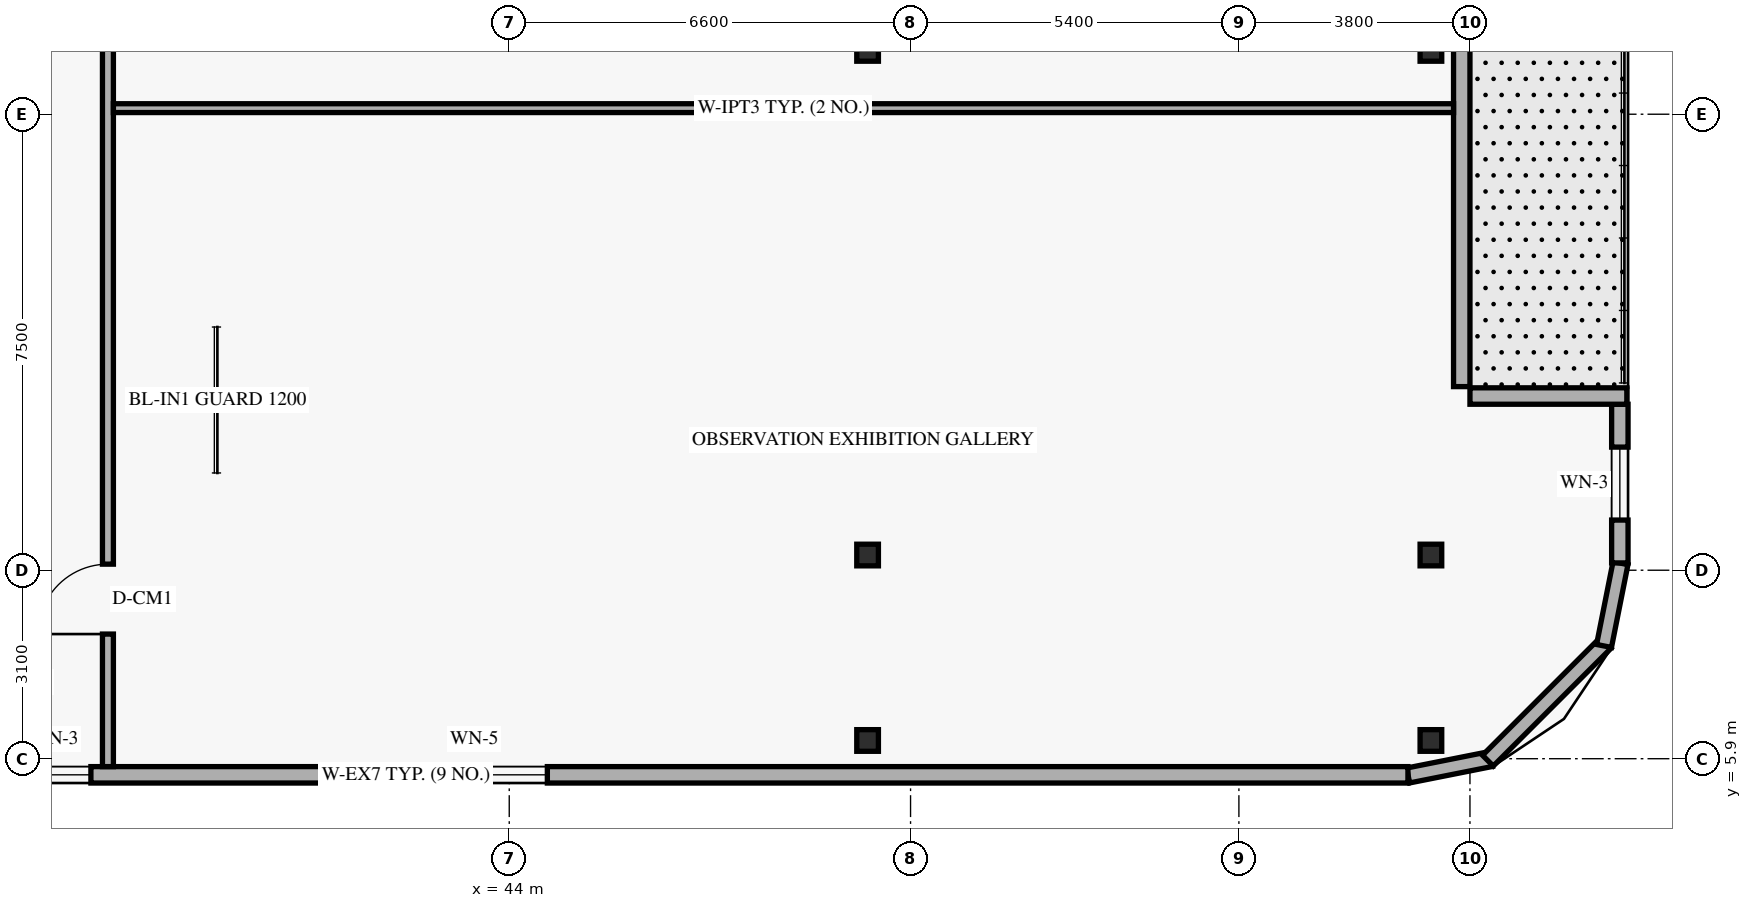
"""IFC4 building model, lengths in metres.
Left out: names, types, materials, properties, quantities, classifications, styles, units other than length and angle.
Written with IfcOpenShell. Run it as: python <this file> out.ifc"""

import sys

from ifc_helpers import new_model, si_unit, direction, frame, frame_2d, origin, origin_2d, place, context, subcontext, project, spatial, rectangle, hollow_rectangle, extrude, element, fill, save


model = new_model("IFC4")
c1 = context("Model", 3, precision=1e-05, world=origin(), true_north=direction((0.0, 1.0)))
c2 = subcontext(c1, "Body", "Model", "MODEL_VIEW")
j1 = project(units=[si_unit("LENGTHUNIT", "METRE"), si_unit("PLANEANGLEUNIT", "RADIAN")], contexts=[c1])
p1 = place(None, origin())
s1 = spatial("IfcSite", under=j1, at=p1, CompositionType="ELEMENT")
p2 = place(p1, origin())
s2 = spatial("IfcBuilding", under=s1, at=p2, CompositionType="ELEMENT")
p3 = place(p2, frame((0.0, 0.0, 282.0)))
s3 = spatial("IfcBuildingStorey", under=s2, at=p3, CompositionType="ELEMENT", Elevation=282.0)
for number, where, z_axis, x_axis in (
    (1, (49.806, 6.2, 0.0), (0.035, 0.0, 0.999), (0.0, 1.0, 0.0)),
    (2, (49.806, 9.25, 0.0), (0.035, 0.0, 0.999), (0.0, 1.0, 0.0)),
    (3, (49.806, 17.55, 0.0), (0.035, 0.0, 0.999), (0.0, 1.0, 0.0)),
):
    element("IfcColumn", number, at=place(p3, frame(where, z_axis=z_axis, x_axis=x_axis)), inside=s3, PredefinedType="COLUMN", context=c2, shape_type="SweptSolid", body=[
        extrude(hollow_rectangle(XDim=0.356, YDim=0.356, WallThickness=0.016, at=origin_2d()), origin(), (0.0, 0.0, 1.0), 5.003),
    ])
for number, where, z_axis, x_axis in (
    (4, (59.013, 6.2, 0.0), (0.058, 0.0, 0.998), (0.0, 1.0, 0.0)),
    (5, (59.013, 9.25, 0.0), (0.058, 0.0, 0.998), (0.0, 1.0, 0.0)),
    (6, (59.013, 17.55, 0.0), (0.058, 0.0, 0.998), (0.0, 1.0, 0.0)),
):
    element("IfcColumn", number, at=place(p3, frame(where, z_axis=z_axis, x_axis=x_axis)), inside=s3, PredefinedType="COLUMN", context=c2, shape_type="SweptSolid", body=[
        extrude(hollow_rectangle(XDim=0.356, YDim=0.356, WallThickness=0.016, at=origin_2d()), origin(), (0.0, 0.0, 1.0), 5.008),
    ])
p4 = place(p3, frame((58.783, 5.624, 0.0), z_axis=(0.0, 0.0, 1.0), x_axis=(0.980809899341, 0.19496651342, 0.0)))
e7 = element("IfcWall", 7, at=p4, inside=s3, PredefinedType="SOLIDWALL", context=c2, shape_type="SweptSolid", body=[
    extrude(rectangle(XDim=1.389, YDim=0.25, at=frame_2d((0.694, 0.0))), origin(), (0.0, 0.0, 1.0), 4.7),
])
p5 = place(p3, frame((60.095, 5.868, 0.0), z_axis=(0.0, 0.0, 1.0), x_axis=(0.707106781187, 0.707106781187, 0.0)))
e8 = element("IfcWall", 8, at=p5, inside=s3, PredefinedType="SOLIDWALL", context=c2, shape_type="SweptSolid", body=[
    extrude(rectangle(XDim=2.739, YDim=0.25, at=frame_2d((1.37, 0.0))), origin(), (0.0, 0.0, 1.0), 4.7),
])
p6 = place(p3, frame((62.005, 7.754, 0.0), z_axis=(0.0, 0.0, 1.0), x_axis=(0.195135625965, 0.9807762678, 0.0)))
e9 = element("IfcWall", 9, at=p6, inside=s3, PredefinedType="SOLIDWALL", context=c2, shape_type="SweptSolid", body=[
    extrude(rectangle(XDim=1.389, YDim=0.25, at=frame_2d((0.694, 0.0))), origin(), (0.0, 0.0, 1.0), 4.7),
])
p7 = place(p3, frame((25.82, 5.635, 0.0), z_axis=(0.0, 0.0, 1.0), x_axis=(1.0, 0.0, 0.0)))
e10 = element("IfcWall", 10, at=p7, inside=s3, PredefinedType="SOLIDWALL", context=c2, shape_type="SweptSolid", body=[
    extrude(rectangle(XDim=32.96, YDim=0.27, at=frame_2d((16.48, 0.0))), origin(), (0.0, 0.0, 1.0), 4.7),
])
p8 = place(p7, frame((3.27, 0.0, 0.85)))
e11 = element("IfcOpeningElement", 11, at=p8, cuts=e10, PredefinedType="OPENING", context=c2, shape_type="SweptSolid", body=[
    extrude(rectangle(XDim=2.4, YDim=1.9, at=frame_2d((1.2, 0.95))), frame((0.0, 0.145, 0.0), z_axis=(0.0, -1.0, 0.0), x_axis=(1.0, 0.0, 0.0)), (0.0, 0.0, 1.0), 0.29),
])
p9 = place(p7, frame((10.1, 0.0, 0.85)))
e12 = element("IfcOpeningElement", 12, at=p9, cuts=e10, PredefinedType="OPENING", context=c2, shape_type="SweptSolid", body=[
    extrude(rectangle(XDim=1.2, YDim=1.5, at=frame_2d((0.6, 0.75))), frame((0.0, 0.145, 0.0), z_axis=(0.0, -1.0, 0.0), x_axis=(1.0, 0.0, 0.0)), (0.0, 0.0, 1.0), 0.29),
])
p10 = place(p7, frame((16.407, 0.0, 0.85)))
e13 = element("IfcOpeningElement", 13, at=p10, cuts=e10, PredefinedType="OPENING", context=c2, shape_type="SweptSolid", body=[
    extrude(rectangle(XDim=2.4, YDim=1.9, at=frame_2d((1.2, 0.95))), frame((0.0, 0.145, 0.0), z_axis=(0.0, -1.0, 0.0), x_axis=(1.0, 0.0, 0.0)), (0.0, 0.0, 1.0), 0.29),
])
p11 = place(p3, frame((62.265, 9.12, 0.0), z_axis=(0.0, 0.0, 1.0), x_axis=(0.0, 1.0, 0.0)))
e14 = element("IfcWall", 14, at=p11, inside=s3, PredefinedType="SOLIDWALL", context=c2, shape_type="SweptSolid", body=[
    extrude(rectangle(XDim=2.61, YDim=0.27, at=frame_2d((1.305, 0.0))), origin(), (0.0, 0.0, 1.0), 4.7),
])
p12 = place(p11, frame((0.705, 0.0, 0.85)))
e15 = element("IfcOpeningElement", 15, at=p12, cuts=e14, PredefinedType="OPENING", context=c2, shape_type="SweptSolid", body=[
    extrude(rectangle(XDim=1.2, YDim=1.5, at=frame_2d((0.6, 0.75))), frame((0.0, 0.145, 0.0), z_axis=(0.0, -1.0, 0.0), x_axis=(1.0, 0.0, 0.0)), (0.0, 0.0, 1.0), 0.29),
])
p13 = place(p3, frame((59.8, 11.865, 0.0), z_axis=(0.0, 0.0, 1.0), x_axis=(1.0, 0.0, 0.0)))
e16 = element("IfcWall", 16, at=p13, inside=s3, PredefinedType="SOLIDWALL", context=c2, shape_type="SweptSolid", body=[
    extrude(rectangle(XDim=2.58, YDim=0.27, at=frame_2d((1.29, 0.0))), origin(), (0.0, 0.0, 1.0), 4.7),
])
p14 = place(p3, frame((59.665, 12.02, 0.0), z_axis=(0.0, 0.0, 1.0), x_axis=(0.0, 1.0, 0.0)))
e17 = element("IfcWall", 17, at=p14, inside=s3, PredefinedType="SOLIDWALL", context=c2, shape_type="SweptSolid", body=[
    extrude(rectangle(XDim=23.96, YDim=0.27, at=frame_2d((11.98, 0.0))), origin(), (0.0, 0.0, 1.0), 4.7),
])
p15 = place(p14, frame((11.4, 0.0, 0.0)))
e18 = element("IfcOpeningElement", 18, at=p15, cuts=e17, PredefinedType="OPENING", context=c2, shape_type="SweptSolid", body=[
    extrude(rectangle(XDim=1.05, YDim=2.15, at=frame_2d((0.525, 1.075))), frame((0.0, 0.145, 0.0), z_axis=(0.0, -1.0, 0.0), x_axis=(1.0, 0.0, 0.0)), (0.0, 0.0, 1.0), 0.29),
])
p16 = place(p14, frame((20.09, 0.0, 0.85)))
e19 = element("IfcOpeningElement", 19, at=p16, cuts=e17, PredefinedType="OPENING", context=c2, shape_type="SweptSolid", body=[
    extrude(rectangle(XDim=2.4, YDim=1.9, at=frame_2d((1.2, 0.95))), frame((0.0, 0.145, 0.0), z_axis=(0.0, -1.0, 0.0), x_axis=(1.0, 0.0, 0.0)), (0.0, 0.0, 1.0), 0.29),
])
p17 = place(p3, frame((37.4, 5.77, 0.0), z_axis=(0.0, 0.0, 1.0), x_axis=(0.0, 1.0, 0.0)))
e20 = element("IfcWall", 20, at=p17, inside=s3, PredefinedType="STANDARD", context=c2, shape_type="SweptSolid", body=[
    extrude(rectangle(XDim=36.46, YDim=0.18, at=frame_2d((18.23, 0.0))), origin(), (0.0, 0.0, 1.0), 4.143),
])
p18 = place(p17, frame((26.32, 0.0, 0.0)))
e21 = element("IfcOpeningElement", 21, at=p18, cuts=e20, PredefinedType="OPENING", context=c2, shape_type="SweptSolid", body=[
    extrude(rectangle(XDim=0.92, YDim=2.14, at=frame_2d((0.46, 1.07))), frame((0.0, 0.1, 0.0), z_axis=(0.0, -1.0, 0.0), x_axis=(1.0, 0.0, 0.0)), (0.0, 0.0, 1.0), 0.2),
])
p19 = place(p17, frame((31.95, 0.0, 0.0)))
e22 = element("IfcOpeningElement", 22, at=p19, cuts=e20, PredefinedType="OPENING", context=c2, shape_type="SweptSolid", body=[
    extrude(rectangle(XDim=0.95, YDim=2.14, at=frame_2d((0.475, 1.07))), frame((0.0, 0.1, 0.0), z_axis=(0.0, -1.0, 0.0), x_axis=(1.0, 0.0, 0.0)), (0.0, 0.0, 1.0), 0.2),
])
p20 = place(p17, frame((2.18, 0.0, 0.0)))
e23 = element("IfcOpeningElement", 23, at=p20, cuts=e20, PredefinedType="OPENING", context=c2, shape_type="SweptSolid", body=[
    extrude(rectangle(XDim=1.15, YDim=2.15, at=frame_2d((0.575, 1.075))), frame((0.0, 0.1, 0.0), z_axis=(0.0, -1.0, 0.0), x_axis=(1.0, 0.0, 0.0)), (0.0, 0.0, 1.0), 0.2),
])
p21 = place(p17, frame((22.63, 0.0, 0.0)))
e24 = element("IfcOpeningElement", 24, at=p21, cuts=e20, PredefinedType="OPENING", context=c2, shape_type="SweptSolid", body=[
    extrude(rectangle(XDim=1.15, YDim=2.15, at=frame_2d((0.575, 1.075))), frame((0.0, 0.1, 0.0), z_axis=(0.0, -1.0, 0.0), x_axis=(1.0, 0.0, 0.0)), (0.0, 0.0, 1.0), 0.2),
])
p22 = place(p3, frame((37.49, 16.6, 0.0), z_axis=(0.0, 0.0, 1.0), x_axis=(1.0, 0.0, 0.0)))
e25 = element("IfcWall", 25, at=p22, inside=s3, PredefinedType="PARTITIONING", context=c2, shape_type="SweptSolid", body=[
    extrude(rectangle(XDim=22.04, YDim=0.145, at=frame_2d((11.02, 0.0))), origin(), (0.0, 0.0, 1.0), 4.143),
])
p23 = place(p9, origin())
e26 = element("IfcWindow", 26, at=p23, inside=s3, PartitioningType="SINGLE_PANEL", PredefinedType="WINDOW", context=c2, shape_type="SweptSolid", body=[
    extrude(rectangle(XDim=1.2, YDim=1.5, at=frame_2d((0.6, 0.75))), frame((0.0, 0.03, 0.0), z_axis=(0.0, -1.0, 0.0), x_axis=(1.0, 0.0, 0.0)), (0.0, 0.0, 1.0), 0.06),
])
fill(e12, e26)
p24 = place(p10, origin())
e27 = element("IfcWindow", 27, at=p24, inside=s3, PartitioningType="SINGLE_PANEL", PredefinedType="WINDOW", context=c2, shape_type="SweptSolid", body=[
    extrude(rectangle(XDim=2.4, YDim=1.9, at=frame_2d((1.2, 0.95))), frame((0.0, 0.03, 0.0), z_axis=(0.0, -1.0, 0.0), x_axis=(1.0, 0.0, 0.0)), (0.0, 0.0, 1.0), 0.06),
])
fill(e13, e27)
p25 = place(p12, origin())
e28 = element("IfcWindow", 28, at=p25, inside=s3, PartitioningType="SINGLE_PANEL", PredefinedType="WINDOW", context=c2, shape_type="SweptSolid", body=[
    extrude(rectangle(XDim=1.2, YDim=1.5, at=frame_2d((0.6, 0.75))), frame((0.0, 0.03, 0.0), z_axis=(0.0, -1.0, 0.0), x_axis=(1.0, 0.0, 0.0)), (0.0, 0.0, 1.0), 0.06),
])
fill(e15, e28)
p26 = place(p20, origin())
e29 = element("IfcDoor", 29, at=p26, inside=s3, OperationType="SINGLE_SWING_LEFT", PredefinedType="DOOR", context=c2, shape_type="SweptSolid", body=[
    extrude(rectangle(XDim=1.15, YDim=2.15, at=frame_2d((0.575, 1.075))), frame((0.0, 0.025, 0.0), z_axis=(0.0, -1.0, 0.0), x_axis=(1.0, 0.0, 0.0)), (0.0, 0.0, 1.0), 0.05),
])
fill(e23, e29)
save(model, sys.argv[1])
